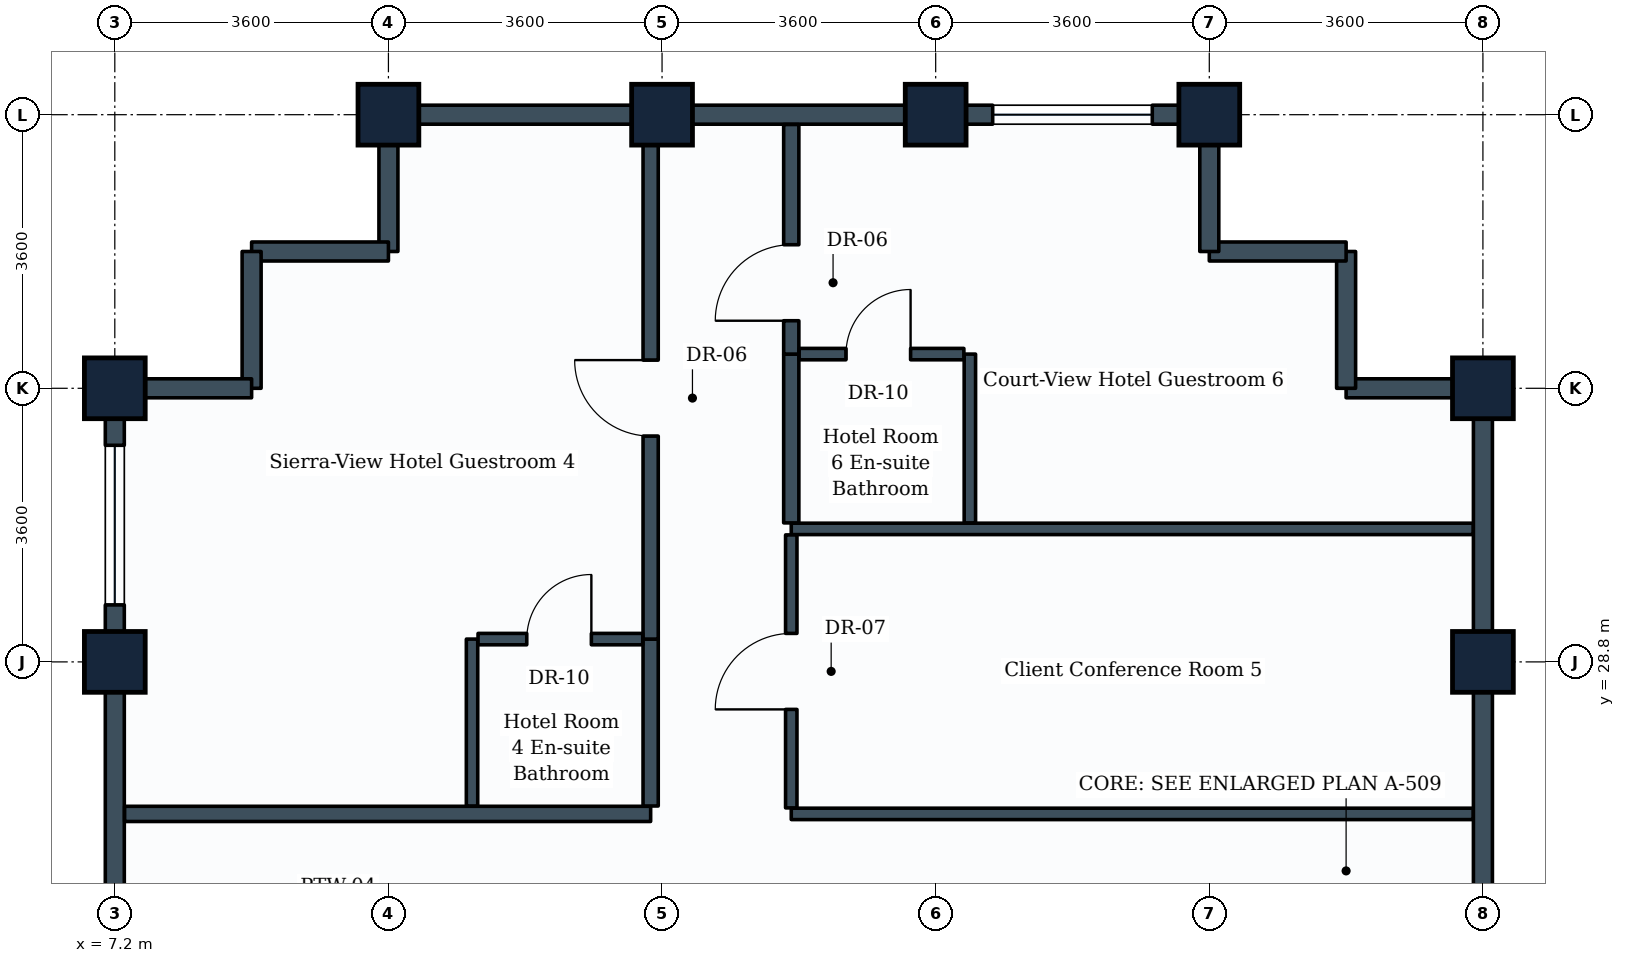
"""IFC4 building model, lengths in metres.
Left out: names, types, materials, properties, quantities, classifications, styles, units other than length and angle.
Written with IfcOpenShell. Run it as: python <this file> out.ifc"""

import sys

from ifc_helpers import new_model, si_unit, direction, frame, frame_2d, origin, origin_2d, place, context, subcontext, project, spatial, rectangle, extrude, element, fill, save


model = new_model("IFC4")
c1 = context("Model", 3, precision=1e-05, world=origin(), true_north=direction((0.0, 1.0)))
c2 = subcontext(c1, "Body", "Model", "MODEL_VIEW")
j1 = project(units=[si_unit("LENGTHUNIT", "METRE"), si_unit("PLANEANGLEUNIT", "RADIAN")], contexts=[c1])
p1 = place(None, origin())
s1 = spatial("IfcSite", under=j1, at=p1, CompositionType="ELEMENT")
p2 = place(p1, origin())
s2 = spatial("IfcBuilding", under=s1, at=p2, CompositionType="ELEMENT")
p3 = place(p2, frame((0.0, 0.0, 255.8)))
s3 = spatial("IfcBuildingStorey", under=s2, at=p3, CompositionType="ELEMENT", Elevation=255.8)
for number, where, z_axis, x_axis in (
    (1, (7.2, 28.8, 0.0), (0.0, 0.0, 1.0), (0.0, 1.0, 0.0)),
    (2, (7.2, 32.4, 0.0), (0.0, 0.0, 1.0), (0.0, 1.0, 0.0)),
    (3, (10.8, 36.0, 0.0), (0.0, 0.0, 1.0), (1.0, 0.0, 0.0)),
    (4, (14.4, 36.0, 0.0), (0.0, 0.0, 1.0), (1.0, 0.0, 0.0)),
    (5, (18.0, 36.0, 0.0), (0.0, 0.0, 1.0), (1.0, 0.0, 0.0)),
    (6, (21.6, 36.0, 0.0), (0.0, 0.0, 1.0), (1.0, 0.0, 0.0)),
    (7, (25.2, 28.8, 0.0), (0.0, 0.0, 1.0), (0.0, 1.0, 0.0)),
    (8, (25.2, 32.4, 0.0), (0.0, 0.0, 1.0), (0.0, 1.0, 0.0)),
):
    element("IfcColumn", number, at=place(p3, frame(where, z_axis=z_axis, x_axis=x_axis)), inside=s3, PredefinedType="COLUMN", context=c2, shape_type="SweptSolid", body=[
        extrude(rectangle(XDim=0.8, YDim=0.8, at=origin_2d()), origin(), (0.0, 0.0, 1.0), 3.6),
    ])
p4 = place(p3, frame((25.2, 28.8, 0.0), z_axis=(0.0, 0.0, 1.0), x_axis=(0.0, -1.0, 0.0)))
e9 = element("IfcWall", 9, at=p4, inside=s3, PredefinedType="STANDARD", context=c2, shape_type="SweptSolid", body=[
    extrude(rectangle(XDim=3.6, YDim=0.25, at=frame_2d((1.8, 0.0))), origin(), (0.0, 0.0, 1.0), 2.83),
])
p5 = place(p3, frame((25.2, 32.4, 0.0), z_axis=(0.0, 0.0, 1.0), x_axis=(0.0, -1.0, 0.0)))
e10 = element("IfcWall", 10, at=p5, inside=s3, PredefinedType="STANDARD", context=c2, shape_type="SweptSolid", body=[
    extrude(rectangle(XDim=3.6, YDim=0.25, at=frame_2d((1.8, 0.0))), origin(), (0.0, 0.0, 1.0), 2.83),
])
p6 = place(p3, frame((23.4, 32.4, 0.0), z_axis=(0.0, 0.0, 1.0), x_axis=(1.0, 0.0, 0.0)))
e11 = element("IfcWall", 11, at=p6, inside=s3, PredefinedType="STANDARD", context=c2, shape_type="SweptSolid", body=[
    extrude(rectangle(XDim=1.8, YDim=0.25, at=frame_2d((0.9, 0.0))), origin(), (0.0, 0.0, 1.0), 2.83),
])
p7 = place(p3, frame((23.4, 32.4, 0.0), z_axis=(0.0, 0.0, 1.0), x_axis=(0.0, 1.0, 0.0)))
e12 = element("IfcWall", 12, at=p7, inside=s3, PredefinedType="STANDARD", context=c2, shape_type="SweptSolid", body=[
    extrude(rectangle(XDim=1.8, YDim=0.25, at=frame_2d((0.9, 0.0))), origin(), (0.0, 0.0, 1.0), 3.335),
])
p8 = place(p3, frame((21.6, 34.2, 0.0), z_axis=(0.0, 0.0, 1.0), x_axis=(1.0, 0.0, 0.0)))
e13 = element("IfcWall", 13, at=p8, inside=s3, PredefinedType="STANDARD", context=c2, shape_type="SweptSolid", body=[
    extrude(rectangle(XDim=1.8, YDim=0.25, at=frame_2d((0.9, 0.0))), origin(), (0.0, 0.0, 1.0), 3.335),
])
p9 = place(p3, frame((21.6, 34.2, 0.0), z_axis=(0.0, 0.0, 1.0), x_axis=(0.0, 1.0, 0.0)))
e14 = element("IfcWall", 14, at=p9, inside=s3, PredefinedType="STANDARD", context=c2, shape_type="SweptSolid", body=[
    extrude(rectangle(XDim=1.8, YDim=0.25, at=frame_2d((0.9, 0.0))), origin(), (0.0, 0.0, 1.0), 2.83),
])
p10 = place(p3, frame((18.0, 36.0, 0.0), z_axis=(0.0, 0.0, 1.0), x_axis=(1.0, 0.0, 0.0)))
e15 = element("IfcWall", 15, at=p10, inside=s3, PredefinedType="STANDARD", context=c2, shape_type="SweptSolid", body=[
    extrude(rectangle(XDim=3.6, YDim=0.25, at=frame_2d((1.8, 0.0))), origin(), (0.0, 0.0, 1.0), 2.83),
])
p11 = place(p10, frame((0.75, 0.0, 0.85)))
e16 = element("IfcOpeningElement", 16, at=p11, cuts=e15, PredefinedType="OPENING", context=c2, shape_type="SweptSolid", body=[
    extrude(rectangle(XDim=2.1, YDim=1.35, at=frame_2d((1.05, 0.675))), frame((0.0, 0.135, 0.0), z_axis=(0.0, -1.0, 0.0), x_axis=(1.0, 0.0, 0.0)), (0.0, 0.0, 1.0), 0.27),
])
p12 = place(p3, frame((14.4, 36.0, 0.0), z_axis=(0.0, 0.0, 1.0), x_axis=(1.0, 0.0, 0.0)))
e17 = element("IfcWall", 17, at=p12, inside=s3, PredefinedType="STANDARD", context=c2, shape_type="SweptSolid", body=[
    extrude(rectangle(XDim=3.6, YDim=0.25, at=frame_2d((1.8, 0.0))), origin(), (0.0, 0.0, 1.0), 2.83),
])
p13 = place(p3, frame((10.8, 36.0, 0.0), z_axis=(0.0, 0.0, 1.0), x_axis=(1.0, 0.0, 0.0)))
e18 = element("IfcWall", 18, at=p13, inside=s3, PredefinedType="STANDARD", context=c2, shape_type="SweptSolid", body=[
    extrude(rectangle(XDim=3.6, YDim=0.25, at=frame_2d((1.8, 0.0))), origin(), (0.0, 0.0, 1.0), 2.83),
])
p14 = place(p3, frame((10.8, 34.2, 0.0), z_axis=(0.0, 0.0, 1.0), x_axis=(0.0, 1.0, 0.0)))
e19 = element("IfcWall", 19, at=p14, inside=s3, PredefinedType="STANDARD", context=c2, shape_type="SweptSolid", body=[
    extrude(rectangle(XDim=1.8, YDim=0.25, at=frame_2d((0.9, 0.0))), origin(), (0.0, 0.0, 1.0), 2.83),
])
for number, where, z_axis, x_axis in (
    (20, (9.0, 34.2, 0.0), (0.0, 0.0, 1.0), (1.0, 0.0, 0.0)),
    (21, (9.0, 32.4, 0.0), (0.0, 0.0, 1.0), (0.0, 1.0, 0.0)),
):
    element("IfcWall", number, at=place(p3, frame(where, z_axis=z_axis, x_axis=x_axis)), inside=s3, PredefinedType="STANDARD", context=c2, shape_type="SweptSolid", body=[
        extrude(rectangle(XDim=1.8, YDim=0.25, at=frame_2d((0.9, 0.0))), origin(), (0.0, 0.0, 1.0), 3.335),
    ])
p15 = place(p3, frame((7.2, 32.4, 0.0), z_axis=(0.0, 0.0, 1.0), x_axis=(1.0, 0.0, 0.0)))
e22 = element("IfcWall", 22, at=p15, inside=s3, PredefinedType="STANDARD", context=c2, shape_type="SweptSolid", body=[
    extrude(rectangle(XDim=1.8, YDim=0.25, at=frame_2d((0.9, 0.0))), origin(), (0.0, 0.0, 1.0), 2.83),
])
p16 = place(p3, frame((7.2, 28.8, 0.0), z_axis=(0.0, 0.0, 1.0), x_axis=(0.0, 1.0, 0.0)))
e23 = element("IfcWall", 23, at=p16, inside=s3, PredefinedType="STANDARD", context=c2, shape_type="SweptSolid", body=[
    extrude(rectangle(XDim=3.6, YDim=0.25, at=frame_2d((1.8, 0.0))), origin(), (0.0, 0.0, 1.0), 2.83),
])
p17 = place(p16, frame((0.75, 0.0, 0.85)))
e24 = element("IfcOpeningElement", 24, at=p17, cuts=e23, PredefinedType="OPENING", context=c2, shape_type="SweptSolid", body=[
    extrude(rectangle(XDim=2.1, YDim=1.35, at=frame_2d((1.05, 0.675))), frame((0.0, 0.135, 0.0), z_axis=(0.0, -1.0, 0.0), x_axis=(1.0, 0.0, 0.0)), (0.0, 0.0, 1.0), 0.27),
])
p18 = place(p3, frame((7.2, 25.2, 0.0), z_axis=(0.0, 0.0, 1.0), x_axis=(0.0, 1.0, 0.0)))
e25 = element("IfcWall", 25, at=p18, inside=s3, PredefinedType="STANDARD", context=c2, shape_type="SweptSolid", body=[
    extrude(rectangle(XDim=3.6, YDim=0.25, at=frame_2d((1.8, 0.0))), origin(), (0.0, 0.0, 1.0), 2.83),
])
p19 = place(p3, frame((7.329, 26.8, 0.0), z_axis=(0.0, 0.0, 1.0), x_axis=(1.0, 0.0, 0.0)))
e26 = element("IfcWall", 26, at=p19, inside=s3, PredefinedType="PARTITIONING", context=c2, shape_type="SweptSolid", body=[
    extrude(rectangle(XDim=6.921, YDim=0.2, at=frame_2d((3.46, 0.0))), origin(), (0.0, 0.0, 1.0), 2.83),
])
p20 = place(p3, frame((14.25, 26.904, 0.0), z_axis=(0.0, 0.0, 1.0), x_axis=(0.0, 1.0, 0.0)))
e27 = element("IfcWall", 27, at=p20, inside=s3, PredefinedType="PARTITIONING", context=c2, shape_type="SweptSolid", body=[
    extrude(rectangle(XDim=2.196, YDim=0.2, at=frame_2d((1.098, 0.0))), origin(), (0.0, 0.0, 1.0), 3.03),
])
p21 = place(p3, frame((14.25, 29.1, 0.0), z_axis=(0.0, 0.0, 1.0), x_axis=(0.0, 1.0, 0.0)))
e28 = element("IfcWall", 28, at=p21, inside=s3, PredefinedType="PARTITIONING", context=c2, shape_type="SweptSolid", body=[
    extrude(rectangle(XDim=6.771, YDim=0.2, at=frame_2d((3.385, 0.0))), origin(), (0.0, 0.0, 1.0), 2.83),
])
p22 = place(p21, frame((2.671, 0.0, 0.0)))
e29 = element("IfcOpeningElement", 29, at=p22, cuts=e28, PredefinedType="OPENING", context=c2, shape_type="SweptSolid", body=[
    extrude(rectangle(XDim=1.0, YDim=2.1, at=frame_2d((0.5, 1.05))), frame((0.0, 0.11, 0.0), z_axis=(0.0, -1.0, 0.0), x_axis=(1.0, 0.0, 0.0)), (0.0, 0.0, 1.0), 0.22),
])
p23 = place(p3, frame((11.9, 26.904, 0.0), z_axis=(0.0, 0.0, 1.0), x_axis=(0.0, 1.0, 0.0)))
e30 = element("IfcWall", 30, at=p23, inside=s3, PredefinedType="PARTITIONING", context=c2, shape_type="SweptSolid", body=[
    extrude(rectangle(XDim=2.196, YDim=0.15, at=frame_2d((1.098, 0.0))), origin(), (0.0, 0.0, 1.0), 3.03),
])
p24 = place(p3, frame((11.979, 29.1, 0.0), z_axis=(0.0, 0.0, 1.0), x_axis=(1.0, 0.0, 0.0)))
e31 = element("IfcWall", 31, at=p24, inside=s3, PredefinedType="PARTITIONING", context=c2, shape_type="SweptSolid", body=[
    extrude(rectangle(XDim=2.167, YDim=0.15, at=frame_2d((1.083, 0.0))), origin(), (0.0, 0.0, 1.0), 3.335),
])
p25 = place(p24, frame((0.641, 0.0, 0.0)))
e32 = element("IfcOpeningElement", 32, at=p25, cuts=e31, PredefinedType="OPENING", context=c2, shape_type="SweptSolid", body=[
    extrude(rectangle(XDim=0.85, YDim=2.1, at=frame_2d((0.425, 1.05))), frame((0.0, 0.085, 0.0), z_axis=(0.0, -1.0, 0.0), x_axis=(1.0, 0.0, 0.0)), (0.0, 0.0, 1.0), 0.17),
])
for number, where, z_axis, x_axis in (
    (33, (16.1, 26.8, 0.0), (0.0, 0.0, 1.0), (1.0, 0.0, 0.0)),
    (34, (16.1, 30.55, 0.0), (0.0, 0.0, 1.0), (1.0, 0.0, 0.0)),
):
    element("IfcWall", number, at=place(p3, frame(where, z_axis=z_axis, x_axis=x_axis)), inside=s3, PredefinedType="PARTITIONING", context=c2, shape_type="SweptSolid", body=[
        extrude(rectangle(XDim=8.971, YDim=0.15, at=frame_2d((4.485, 0.0))), origin(), (0.0, 0.0, 1.0), 2.83),
    ])
p26 = place(p3, frame((16.1, 26.879, 0.0), z_axis=(0.0, 0.0, 1.0), x_axis=(0.0, 1.0, 0.0)))
e35 = element("IfcWall", 35, at=p26, inside=s3, PredefinedType="PARTITIONING", context=c2, shape_type="SweptSolid", body=[
    extrude(rectangle(XDim=3.592, YDim=0.15, at=frame_2d((1.796, 0.0))), origin(), (0.0, 0.0, 1.0), 3.03),
])
p27 = place(p26, frame((1.296, 0.0, 0.0)))
e36 = element("IfcOpeningElement", 36, at=p27, cuts=e35, PredefinedType="OPENING", context=c2, shape_type="SweptSolid", body=[
    extrude(rectangle(XDim=1.0, YDim=2.1, at=frame_2d((0.5, 1.05))), frame((0.0, 0.085, 0.0), z_axis=(0.0, -1.0, 0.0), x_axis=(1.0, 0.0, 0.0)), (0.0, 0.0, 1.0), 0.17),
])
p28 = place(p3, frame((16.1, 30.629, 0.0), z_axis=(0.0, 0.0, 1.0), x_axis=(0.0, 1.0, 0.0)))
e37 = element("IfcWall", 37, at=p28, inside=s3, PredefinedType="PARTITIONING", context=c2, shape_type="SweptSolid", body=[
    extrude(rectangle(XDim=2.221, YDim=0.2, at=frame_2d((1.111, 0.0))), origin(), (0.0, 0.0, 1.0), 3.335),
])
p29 = place(p3, frame((16.1, 32.85, 0.0), z_axis=(0.0, 0.0, 1.0), x_axis=(0.0, 1.0, 0.0)))
e38 = element("IfcWall", 38, at=p29, inside=s3, PredefinedType="PARTITIONING", context=c2, shape_type="SweptSolid", body=[
    extrude(rectangle(XDim=3.021, YDim=0.2, at=frame_2d((1.51, 0.0))), origin(), (0.0, 0.0, 1.0), 2.83),
])
p30 = place(p29, frame((0.439, 0.0, 0.0)))
e39 = element("IfcOpeningElement", 39, at=p30, cuts=e38, PredefinedType="OPENING", context=c2, shape_type="SweptSolid", body=[
    extrude(rectangle(XDim=1.0, YDim=2.1, at=frame_2d((0.5, 1.05))), frame((0.0, 0.11, 0.0), z_axis=(0.0, -1.0, 0.0), x_axis=(1.0, 0.0, 0.0)), (0.0, 0.0, 1.0), 0.22),
])
p31 = place(p3, frame((18.45, 30.629, 0.0), z_axis=(0.0, 0.0, 1.0), x_axis=(0.0, 1.0, 0.0)))
e40 = element("IfcWall", 40, at=p31, inside=s3, PredefinedType="PARTITIONING", context=c2, shape_type="SweptSolid", body=[
    extrude(rectangle(XDim=2.221, YDim=0.15, at=frame_2d((1.111, 0.0))), origin(), (0.0, 0.0, 1.0), 3.335),
])
p32 = place(p3, frame((16.204, 32.85, 0.0), z_axis=(0.0, 0.0, 1.0), x_axis=(1.0, 0.0, 0.0)))
e41 = element("IfcWall", 41, at=p32, inside=s3, PredefinedType="PARTITIONING", context=c2, shape_type="SweptSolid", body=[
    extrude(rectangle(XDim=2.167, YDim=0.15, at=frame_2d((1.083, 0.0))), origin(), (0.0, 0.0, 1.0), 3.03),
])
p33 = place(p32, frame((0.616, 0.0, 0.0)))
e42 = element("IfcOpeningElement", 42, at=p33, cuts=e41, PredefinedType="OPENING", context=c2, shape_type="SweptSolid", body=[
    extrude(rectangle(XDim=0.85, YDim=2.1, at=frame_2d((0.425, 1.05))), frame((0.0, 0.085, 0.0), z_axis=(0.0, -1.0, 0.0), x_axis=(1.0, 0.0, 0.0)), (0.0, 0.0, 1.0), 0.17),
])
p34 = place(p11, origin())
e43 = element("IfcWindow", 43, at=p34, inside=s3, PartitioningType="SINGLE_PANEL", PredefinedType="WINDOW", context=c2, shape_type="SweptSolid", body=[
    extrude(rectangle(XDim=2.1, YDim=1.35, at=frame_2d((1.05, 0.675))), frame((0.0, 0.03, 0.0), z_axis=(0.0, -1.0, 0.0), x_axis=(1.0, 0.0, 0.0)), (0.0, 0.0, 1.0), 0.06),
])
fill(e16, e43)
p35 = place(p17, origin())
e44 = element("IfcWindow", 44, at=p35, inside=s3, PartitioningType="SINGLE_PANEL", PredefinedType="WINDOW", context=c2, shape_type="SweptSolid", body=[
    extrude(rectangle(XDim=2.1, YDim=1.35, at=frame_2d((1.05, 0.675))), frame((0.0, 0.03, 0.0), z_axis=(0.0, -1.0, 0.0), x_axis=(1.0, 0.0, 0.0)), (0.0, 0.0, 1.0), 0.06),
])
fill(e24, e44)
p36 = place(p22, origin())
e45 = element("IfcDoor", 45, at=p36, inside=s3, OperationType="SINGLE_SWING_RIGHT", PredefinedType="DOOR", context=c2, shape_type="SweptSolid", body=[
    extrude(rectangle(XDim=1.0, YDim=2.1, at=frame_2d((0.5, 1.05))), frame((0.0, 0.025, 0.0), z_axis=(0.0, -1.0, 0.0), x_axis=(1.0, 0.0, 0.0)), (0.0, 0.0, 1.0), 0.05),
])
fill(e29, e45)
p37 = place(p25, origin())
e46 = element("IfcDoor", 46, at=p37, inside=s3, OperationType="SINGLE_SWING_RIGHT", PredefinedType="DOOR", context=c2, shape_type="SweptSolid", body=[
    extrude(rectangle(XDim=0.85, YDim=2.1, at=frame_2d((0.425, 1.05))), frame((0.0, 0.025, 0.0), z_axis=(0.0, -1.0, 0.0), x_axis=(1.0, 0.0, 0.0)), (0.0, 0.0, 1.0), 0.05),
])
fill(e32, e46)
p38 = place(p27, origin())
e47 = element("IfcDoor", 47, at=p38, inside=s3, OperationType="SINGLE_SWING_LEFT", PredefinedType="DOOR", context=c2, shape_type="SweptSolid", body=[
    extrude(rectangle(XDim=1.0, YDim=2.1, at=frame_2d((0.5, 1.05))), frame((0.0, 0.025, 0.0), z_axis=(0.0, -1.0, 0.0), x_axis=(1.0, 0.0, 0.0)), (0.0, 0.0, 1.0), 0.05),
])
fill(e36, e47)
p39 = place(p30, origin())
e48 = element("IfcDoor", 48, at=p39, inside=s3, OperationType="SINGLE_SWING_LEFT", PredefinedType="DOOR", context=c2, shape_type="SweptSolid", body=[
    extrude(rectangle(XDim=1.0, YDim=2.1, at=frame_2d((0.5, 1.05))), frame((0.0, 0.025, 0.0), z_axis=(0.0, -1.0, 0.0), x_axis=(1.0, 0.0, 0.0)), (0.0, 0.0, 1.0), 0.05),
])
fill(e39, e48)
p40 = place(p33, origin())
e49 = element("IfcDoor", 49, at=p40, inside=s3, OperationType="SINGLE_SWING_RIGHT", PredefinedType="DOOR", context=c2, shape_type="SweptSolid", body=[
    extrude(rectangle(XDim=0.85, YDim=2.1, at=frame_2d((0.425, 1.05))), frame((0.0, 0.025, 0.0), z_axis=(0.0, -1.0, 0.0), x_axis=(1.0, 0.0, 0.0)), (0.0, 0.0, 1.0), 0.05),
])
fill(e42, e49)
save(model, sys.argv[1])
